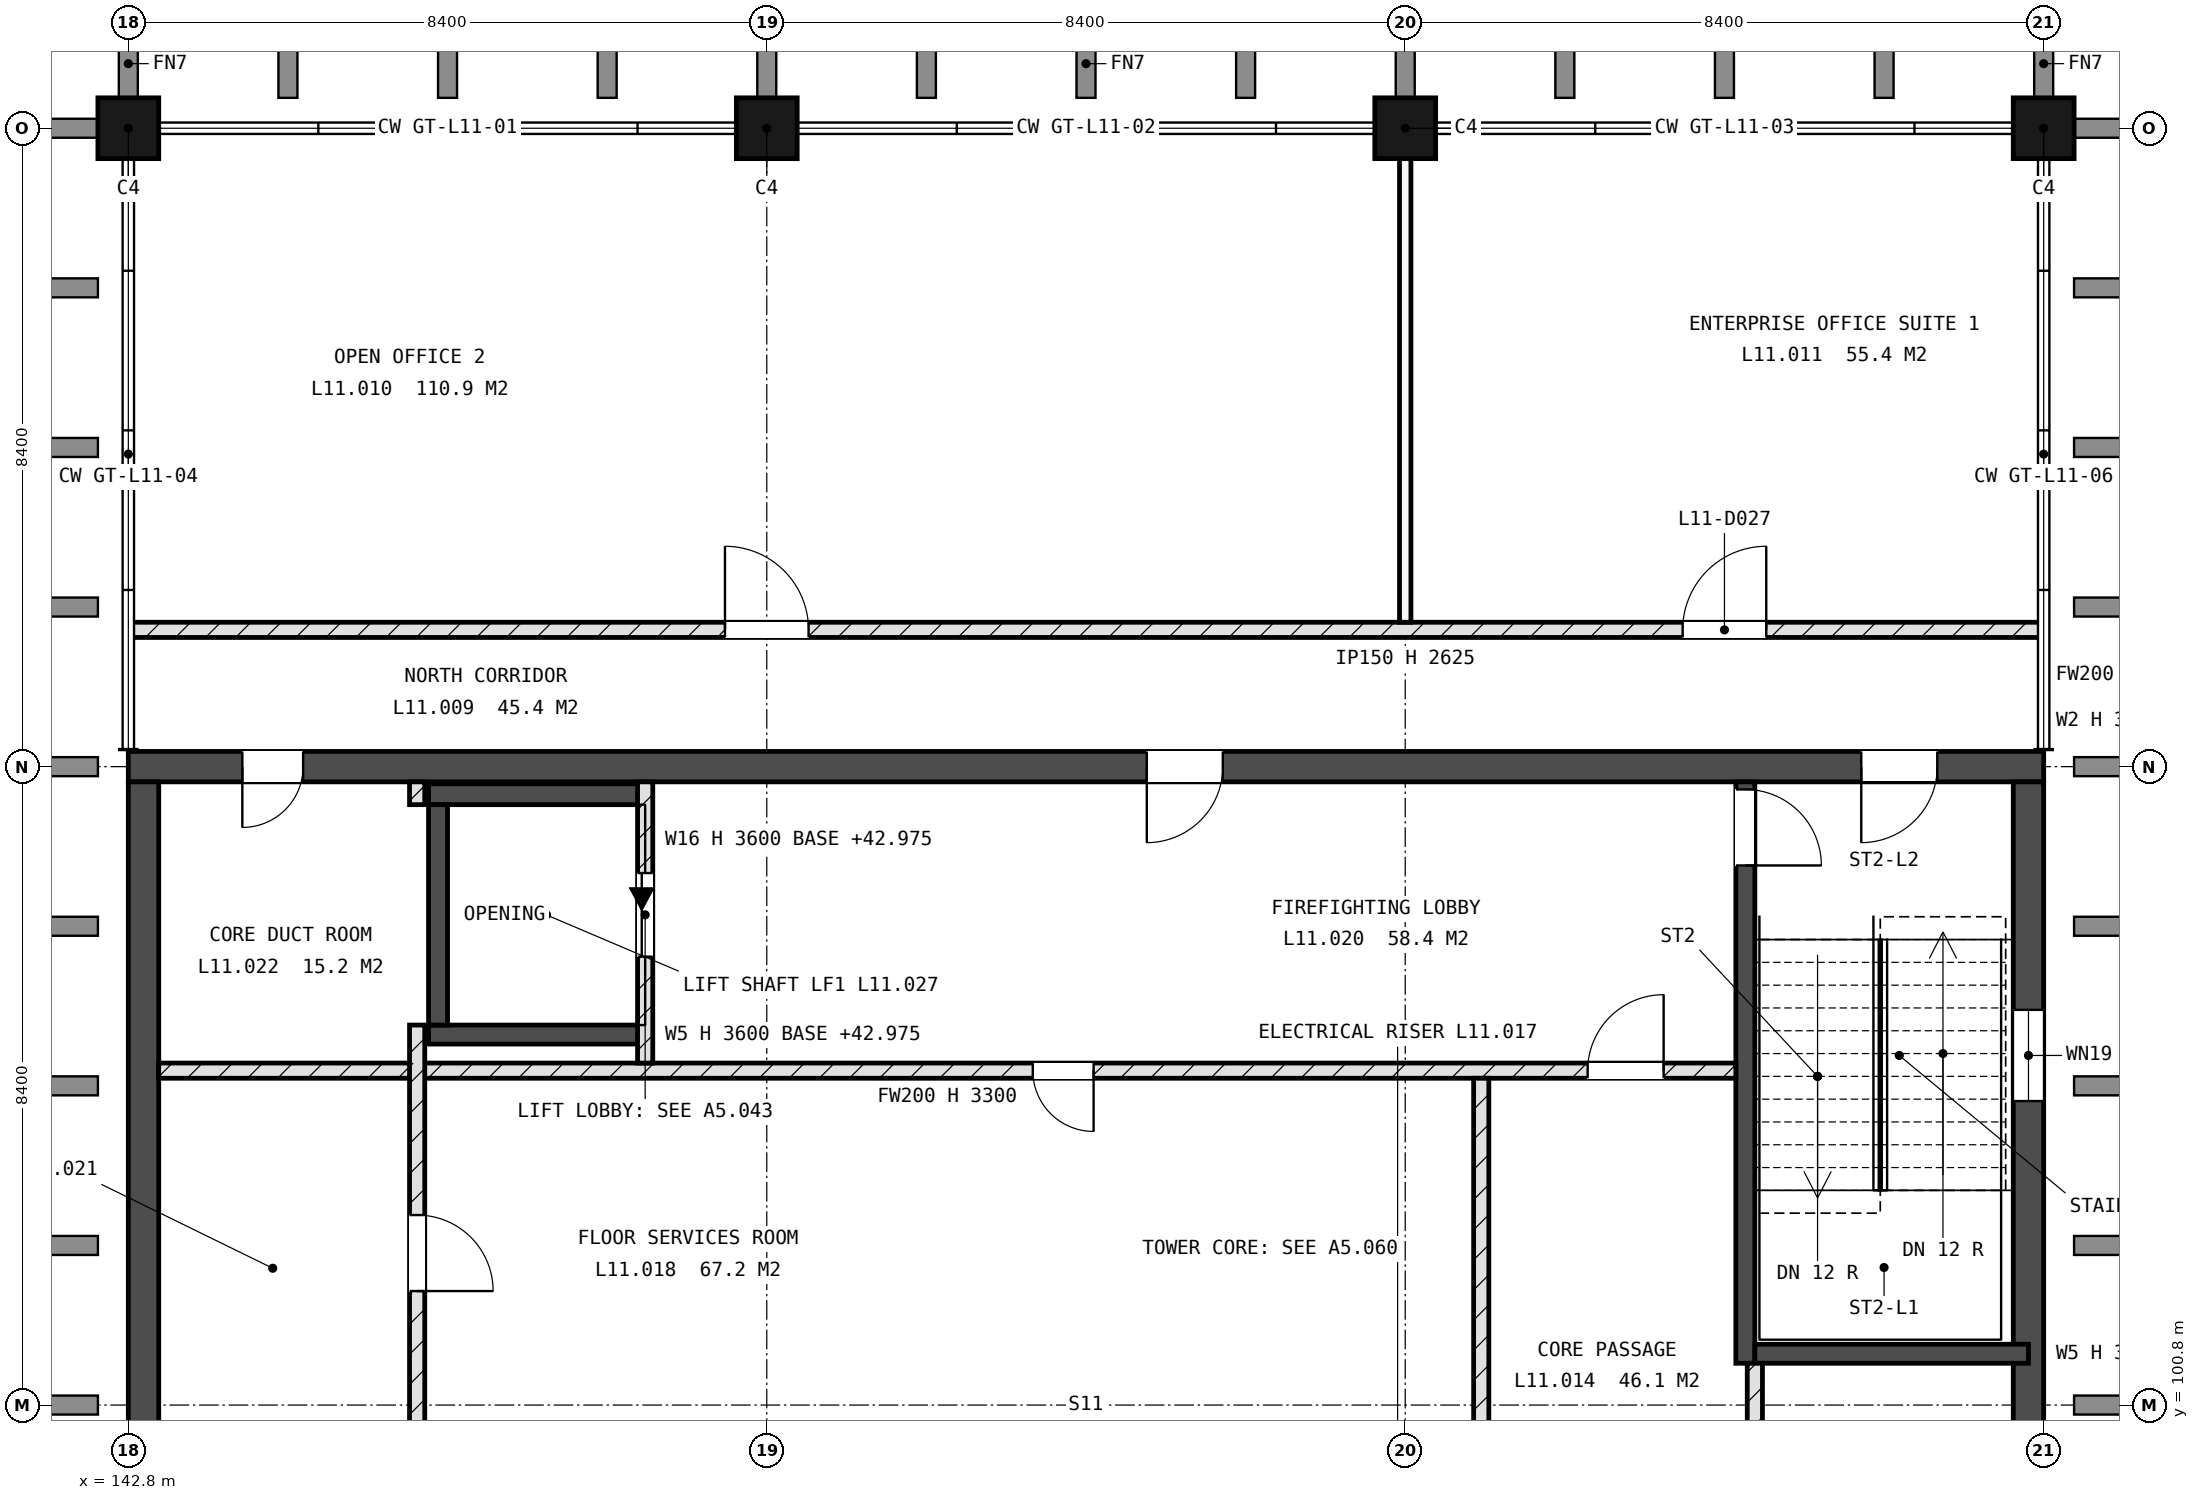
"""IFC4 building model, lengths in metres.
Left out: names, types, materials, properties, quantities, classifications, styles, units other than length and angle.
Written with IfcOpenShell. Run it as: python <this file> out.ifc"""

import sys

from ifc_helpers import new_model, si_unit, direction, frame, frame_2d, origin, origin_2d, place, context, subcontext, project, spatial, rectangle, extrude, element, fill, save


model = new_model("IFC4")
c1 = context("Model", 3, precision=1e-05, world=origin(), true_north=direction((0.0, 1.0)))
c2 = subcontext(c1, "Body", "Model", "MODEL_VIEW")
j1 = project(units=[si_unit("LENGTHUNIT", "METRE"), si_unit("PLANEANGLEUNIT", "RADIAN")], contexts=[c1])
p1 = place(None, origin())
s1 = spatial("IfcSite", under=j1, at=p1, CompositionType="ELEMENT")
p2 = place(p1, origin())
s2 = spatial("IfcBuilding", under=s1, at=p2, CompositionType="ELEMENT")
p3 = place(p2, frame((0.0, 0.0, 43.2)))
s3 = spatial("IfcBuildingStorey", under=s2, at=p3, CompositionType="ELEMENT", Elevation=43.2)
for number, where, z_axis, x_axis in (
    (1, (142.8, 117.6, -0.225), (0.0, 0.0, 1.0), (1.0, 0.0, 0.0)),
    (2, (151.2, 117.6, -0.225), (0.0, 0.0, 1.0), (1.0, 0.0, 0.0)),
    (3, (159.6, 117.6, -0.225), (0.0, 0.0, 1.0), (1.0, 0.0, 0.0)),
    (4, (168.0, 117.6, -0.225), (0.0, 0.0, 1.0), (1.0, 0.0, 0.0)),
):
    element("IfcColumn", number, at=place(p3, frame(where, z_axis=z_axis, x_axis=x_axis)), inside=s3, PredefinedType="COLUMN", context=c2, shape_type="SweptSolid", body=[
        extrude(rectangle(XDim=0.8, YDim=0.8, at=origin_2d()), origin(), (0.0, 0.0, 1.0), 3.6),
    ])
p4 = place(p3, frame((142.8, 109.2, -0.225), z_axis=(0.0, 0.0, 1.0), x_axis=(1.0, 0.0, 0.0)))
e5 = element("IfcWall", 5, at=p4, inside=s3, PredefinedType="SHEAR", context=c2, shape_type="SweptSolid", body=[
    extrude(rectangle(XDim=25.2, YDim=0.4, at=frame_2d((12.6, 0.0))), origin(), (0.0, 0.0, 1.0), 3.6),
])
p5 = place(p4, frame((22.8, 0.0, 0.225)))
e6 = element("IfcOpeningElement", 6, at=p5, cuts=e5, PredefinedType="OPENING", context=c2, shape_type="SweptSolid", body=[
    extrude(rectangle(XDim=1.0, YDim=2.1, at=frame_2d((0.5, 1.05))), frame((0.0, 0.21, 0.0), z_axis=(0.0, -1.0, 0.0), x_axis=(1.0, 0.0, 0.0)), (0.0, 0.0, 1.0), 0.42),
])
p6 = place(p4, frame((1.5, 0.0, 0.225)))
e7 = element("IfcOpeningElement", 7, at=p6, cuts=e5, PredefinedType="OPENING", context=c2, shape_type="SweptSolid", body=[
    extrude(rectangle(XDim=0.8, YDim=2.1, at=frame_2d((0.4, 1.05))), frame((0.0, 0.21, 0.0), z_axis=(0.0, -1.0, 0.0), x_axis=(1.0, 0.0, 0.0)), (0.0, 0.0, 1.0), 0.42),
])
p7 = place(p4, frame((13.4, 0.0, 0.225)))
e8 = element("IfcOpeningElement", 8, at=p7, cuts=e5, PredefinedType="OPENING", context=c2, shape_type="SweptSolid", body=[
    extrude(rectangle(XDim=1.0, YDim=2.1, at=frame_2d((0.5, 1.05))), frame((0.0, 0.21, 0.0), z_axis=(0.0, -1.0, 0.0), x_axis=(1.0, 0.0, 0.0)), (0.0, 0.0, 1.0), 0.42),
])
p8 = place(p3, frame((143.0, 92.6, -0.225), z_axis=(0.0, 0.0, 1.0), x_axis=(0.0, 1.0, 0.0)))
e9 = element("IfcWall", 9, at=p8, inside=s3, PredefinedType="SHEAR", context=c2, shape_type="SweptSolid", body=[
    extrude(rectangle(XDim=16.4, YDim=0.4, at=frame_2d((8.2, 0.0))), origin(), (0.0, 0.0, 1.0), 3.6),
])
p9 = place(p8, frame((3.0, 0.0, 1.825)))
e10 = element("IfcOpeningElement", 10, at=p9, cuts=e9, PredefinedType="OPENING", context=c2, shape_type="SweptSolid", body=[
    extrude(rectangle(XDim=1.2, YDim=0.9, at=frame_2d((0.6, 0.45))), frame((0.0, 0.21, 0.0), z_axis=(0.0, -1.0, 0.0), x_axis=(1.0, 0.0, 0.0)), (0.0, 0.0, 1.0), 0.42),
])
p10 = place(p3, frame((167.8, 92.6, -0.225), z_axis=(0.0, 0.0, 1.0), x_axis=(0.0, 1.0, 0.0)))
e11 = element("IfcWall", 11, at=p10, inside=s3, PredefinedType="SHEAR", context=c2, shape_type="SweptSolid", body=[
    extrude(rectangle(XDim=16.4, YDim=0.4, at=frame_2d((8.2, 0.0))), origin(), (0.0, 0.0, 1.0), 3.6),
])
p11 = place(p10, frame((12.2, 0.0, 1.825)))
e12 = element("IfcOpeningElement", 12, at=p11, cuts=e11, PredefinedType="OPENING", context=c2, shape_type="SweptSolid", body=[
    extrude(rectangle(XDim=1.2, YDim=0.9, at=frame_2d((0.6, 0.45))), frame((0.0, 0.21, 0.0), z_axis=(0.0, -1.0, 0.0), x_axis=(1.0, 0.0, 0.0)), (0.0, 0.0, 1.0), 0.42),
])
p12 = place(p3, frame((164.075, 101.35, -0.225), z_axis=(0.0, 0.0, 1.0), x_axis=(0.0, 1.0, 0.0)))
e13 = element("IfcWall", 13, at=p12, inside=s3, PredefinedType="SHEAR", context=c2, shape_type="SweptSolid", body=[
    extrude(rectangle(XDim=7.65, YDim=0.25, at=frame_2d((3.825, 0.0))), origin(), (0.0, 0.0, 1.0), 3.6),
])
p13 = place(p12, frame((6.55, 0.0, 0.225)))
e14 = element("IfcOpeningElement", 14, at=p13, cuts=e13, PredefinedType="OPENING", context=c2, shape_type="SweptSolid", body=[
    extrude(rectangle(XDim=1.0, YDim=2.1, at=frame_2d((0.5, 1.05))), frame((0.0, 0.135, 0.0), z_axis=(0.0, -1.0, 0.0), x_axis=(1.0, 0.0, 0.0)), (0.0, 0.0, 1.0), 0.27),
])
p14 = place(p3, frame((164.2, 101.475, -0.225), z_axis=(0.0, 0.0, 1.0), x_axis=(1.0, 0.0, 0.0)))
e15 = element("IfcWall", 15, at=p14, inside=s3, PredefinedType="SHEAR", context=c2, shape_type="SweptSolid", body=[
    extrude(rectangle(XDim=3.6, YDim=0.25, at=frame_2d((1.8, 0.0))), origin(), (0.0, 0.0, 1.0), 3.6),
])
p15 = place(p3, frame((146.75, 105.675, -0.225), z_axis=(0.0, 0.0, 1.0), x_axis=(1.0, 0.0, 0.0)))
e16 = element("IfcWall", 16, at=p15, inside=s3, PredefinedType="SHEAR", context=c2, shape_type="SweptSolid", body=[
    extrude(rectangle(XDim=2.85, YDim=0.25, at=frame_2d((1.425, 0.0))), origin(), (0.0, 0.0, 1.0), 3.6),
])
p16 = place(p3, frame((146.75, 108.837, -0.225), z_axis=(0.0, 0.0, 1.0), x_axis=(1.0, 0.0, 0.0)))
e17 = element("IfcWall", 17, at=p16, inside=s3, PredefinedType="SHEAR", context=c2, shape_type="SweptSolid", body=[
    extrude(rectangle(XDim=2.85, YDim=0.275, at=frame_2d((1.425, 0.0))), origin(), (0.0, 0.0, 1.0), 3.6),
])
p17 = place(p3, frame((146.875, 105.8, -0.225), z_axis=(0.0, 0.0, 1.0), x_axis=(0.0, 1.0, 0.0)))
e18 = element("IfcWall", 18, at=p17, inside=s3, PredefinedType="SHEAR", context=c2, shape_type="SweptSolid", body=[
    extrude(rectangle(XDim=2.9, YDim=0.25, at=frame_2d((1.45, 0.0))), origin(), (0.0, 0.0, 1.0), 3.6),
])
p18 = place(p3, frame((143.2, 105.2, 0.0), z_axis=(0.0, 0.0, 1.0), x_axis=(1.0, 0.0, 0.0)))
e19 = element("IfcWall", 19, at=p18, inside=s3, PredefinedType="SOLIDWALL", context=c2, shape_type="SweptSolid", body=[
    extrude(rectangle(XDim=20.75, YDim=0.2, at=frame_2d((10.375, 0.0))), origin(), (0.0, 0.0, 1.0), 3.3),
])
p19 = place(p18, frame((11.5, 0.0, 0.0)))
e20 = element("IfcOpeningElement", 20, at=p19, cuts=e19, PredefinedType="OPENING", context=c2, shape_type="SweptSolid", body=[
    extrude(rectangle(XDim=0.8, YDim=2.1, at=frame_2d((0.4, 1.05))), frame((0.0, 0.11, 0.0), z_axis=(0.0, -1.0, 0.0), x_axis=(1.0, 0.0, 0.0)), (0.0, 0.0, 1.0), 0.22),
])
p20 = place(p18, frame((18.8, 0.0, 0.0)))
e21 = element("IfcOpeningElement", 21, at=p20, cuts=e19, PredefinedType="OPENING", context=c2, shape_type="SweptSolid", body=[
    extrude(rectangle(XDim=1.0, YDim=2.1, at=frame_2d((0.5, 1.05))), frame((0.0, 0.11, 0.0), z_axis=(0.0, -1.0, 0.0), x_axis=(1.0, 0.0, 0.0)), (0.0, 0.0, 1.0), 0.22),
])
p21 = place(p3, frame((142.8, 111.0, 0.0), z_axis=(0.0, 0.0, 1.0), x_axis=(1.0, 0.0, 0.0)))
e22 = element("IfcWall", 22, at=p21, inside=s3, PredefinedType="SOLIDWALL", context=c2, shape_type="SweptSolid", body=[
    extrude(rectangle(XDim=25.2, YDim=0.2, at=frame_2d((12.6, 0.0))), origin(), (0.0, 0.0, 1.0), 3.3),
])
p22 = place(p21, frame((7.85, 0.0, 0.0)))
e23 = element("IfcOpeningElement", 23, at=p22, cuts=e22, PredefinedType="OPENING", context=c2, shape_type="SweptSolid", body=[
    extrude(rectangle(XDim=1.1, YDim=2.25, at=frame_2d((0.55, 1.125))), frame((0.0, 0.11, 0.0), z_axis=(0.0, -1.0, 0.0), x_axis=(1.0, 0.0, 0.0)), (0.0, 0.0, 1.0), 0.22),
])
p23 = place(p21, frame((20.45, 0.0, 0.0)))
e24 = element("IfcOpeningElement", 24, at=p23, cuts=e22, PredefinedType="OPENING", context=c2, shape_type="SweptSolid", body=[
    extrude(rectangle(XDim=1.1, YDim=2.25, at=frame_2d((0.55, 1.125))), frame((0.0, 0.11, 0.0), z_axis=(0.0, -1.0, 0.0), x_axis=(1.0, 0.0, 0.0)), (0.0, 0.0, 1.0), 0.22),
])
p24 = place(p3, frame((146.6, 100.5, 0.0), z_axis=(0.0, 0.0, 1.0), x_axis=(0.0, 1.0, 0.0)))
e25 = element("IfcWall", 25, at=p24, inside=s3, PredefinedType="SOLIDWALL", context=c2, shape_type="SweptSolid", body=[
    extrude(rectangle(XDim=5.3, YDim=0.2, at=frame_2d((2.65, 0.0))), origin(), (0.0, 0.0, 1.0), 3.3),
])
p25 = place(p24, frame((1.8, 0.0, 0.0)))
e26 = element("IfcOpeningElement", 26, at=p25, cuts=e25, PredefinedType="OPENING", context=c2, shape_type="SweptSolid", body=[
    extrude(rectangle(XDim=1.0, YDim=2.1, at=frame_2d((0.5, 1.05))), frame((0.0, 0.11, 0.0), z_axis=(0.0, -1.0, 0.0), x_axis=(1.0, 0.0, 0.0)), (0.0, 0.0, 1.0), 0.22),
])
p26 = place(p3, frame((146.6, 108.7, 0.0), z_axis=(0.0, 0.0, 1.0), x_axis=(0.0, 1.0, 0.0)))
e27 = element("IfcWall", 27, at=p26, inside=s3, PredefinedType="SOLIDWALL", context=c2, shape_type="SweptSolid", body=[
    extrude(rectangle(XDim=0.3, YDim=0.2, at=frame_2d((0.15, 0.0))), origin(), (0.0, 0.0, 1.0), 3.3),
])
p27 = place(p3, frame((149.6, 105.3, 0.0), z_axis=(0.0, 0.0, 1.0), x_axis=(0.0, 1.0, 0.0)))
e28 = element("IfcWall", 28, at=p27, inside=s3, PredefinedType="SOLIDWALL", context=c2, shape_type="SweptSolid", body=[
    extrude(rectangle(XDim=3.7, YDim=0.2, at=frame_2d((1.85, 0.0))), origin(), (0.0, 0.0, 1.0), 3.3),
])
p28 = place(p27, frame((1.4, 0.0, 0.0)))
e29 = element("IfcOpeningElement", 29, at=p28, cuts=e28, PredefinedType="OPENING", context=c2, shape_type="SweptSolid", body=[
    extrude(rectangle(XDim=1.1, YDim=2.1, at=frame_2d((0.55, 1.05))), frame((0.0, 0.11, 0.0), z_axis=(0.0, -1.0, 0.0), x_axis=(1.0, 0.0, 0.0)), (0.0, 0.0, 1.0), 0.22),
])
p29 = place(p3, frame((159.6, 111.1, 0.0), z_axis=(0.0, 0.0, 1.0), x_axis=(0.0, 1.0, 0.0)))
e30 = element("IfcWall", 30, at=p29, inside=s3, PredefinedType="PARTITIONING", context=c2, shape_type="SweptSolid", body=[
    extrude(rectangle(XDim=6.5, YDim=0.15, at=frame_2d((3.25, 0.0))), origin(), (0.0, 0.0, 1.0), 2.625),
])
p30 = place(p3, frame((160.6, 92.6, 0.0), z_axis=(0.0, 0.0, 1.0), x_axis=(0.0, 1.0, 0.0)))
e31 = element("IfcWall", 31, at=p30, inside=s3, PredefinedType="SOLIDWALL", context=c2, shape_type="SweptSolid", body=[
    extrude(rectangle(XDim=12.5, YDim=0.2, at=frame_2d((6.25, 0.0))), origin(), (0.0, 0.0, 1.0), 3.3),
])
p31 = place(p30, frame((5.1, 0.0, 0.0)))
e32 = element("IfcOpeningElement", 32, at=p31, cuts=e31, PredefinedType="OPENING", context=c2, shape_type="SweptSolid", body=[
    extrude(rectangle(XDim=0.8, YDim=2.1, at=frame_2d((0.4, 1.05))), frame((0.0, 0.11, 0.0), z_axis=(0.0, -1.0, 0.0), x_axis=(1.0, 0.0, 0.0)), (0.0, 0.0, 1.0), 0.22),
])
p32 = place(p30, frame((0.8, 0.0, 0.0)))
e33 = element("IfcOpeningElement", 33, at=p32, cuts=e31, PredefinedType="OPENING", context=c2, shape_type="SweptSolid", body=[
    extrude(rectangle(XDim=1.0, YDim=2.1, at=frame_2d((0.5, 1.05))), frame((0.0, 0.11, 0.0), z_axis=(0.0, -1.0, 0.0), x_axis=(1.0, 0.0, 0.0)), (0.0, 0.0, 1.0), 0.22),
])
p33 = place(p3, frame((164.2, 92.6, 0.0), z_axis=(0.0, 0.0, 1.0), x_axis=(0.0, 1.0, 0.0)))
e34 = element("IfcWall", 34, at=p33, inside=s3, PredefinedType="SOLIDWALL", context=c2, shape_type="SweptSolid", body=[
    extrude(rectangle(XDim=8.75, YDim=0.2, at=frame_2d((4.375, 0.0))), origin(), (0.0, 0.0, 1.0), 3.3),
])
p34 = place(p33, frame((1.7, 0.0, 0.0)))
e35 = element("IfcOpeningElement", 35, at=p34, cuts=e34, PredefinedType="OPENING", context=c2, shape_type="SweptSolid", body=[
    extrude(rectangle(XDim=0.8, YDim=2.1, at=frame_2d((0.4, 1.05))), frame((0.0, 0.11, 0.0), z_axis=(0.0, -1.0, 0.0), x_axis=(1.0, 0.0, 0.0)), (0.0, 0.0, 1.0), 0.22),
])
p35 = place(p33, frame((6.3, 0.0, 0.0)))
e36 = element("IfcOpeningElement", 36, at=p35, cuts=e34, PredefinedType="OPENING", context=c2, shape_type="SweptSolid", body=[
    extrude(rectangle(XDim=0.8, YDim=2.1, at=frame_2d((0.4, 1.05))), frame((0.0, 0.11, 0.0), z_axis=(0.0, -1.0, 0.0), x_axis=(1.0, 0.0, 0.0)), (0.0, 0.0, 1.0), 0.22),
])
p36 = place(p11, origin())
e37 = element("IfcWindow", 37, at=p36, inside=s3, PartitioningType="SINGLE_PANEL", PredefinedType="WINDOW", context=c2, shape_type="SweptSolid", body=[
    extrude(rectangle(XDim=1.2, YDim=0.9, at=frame_2d((0.6, 0.45))), frame((0.0, 0.03, 0.0), z_axis=(0.0, -1.0, 0.0), x_axis=(1.0, 0.0, 0.0)), (0.0, 0.0, 1.0), 0.06),
])
fill(e12, e37)
p37 = place(p28, origin())
e38 = element("IfcDoor", 38, at=p37, inside=s3, OperationType="SLIDING_TO_LEFT", PredefinedType="DOOR", context=c2, shape_type="SweptSolid", body=[
    extrude(rectangle(XDim=1.1, YDim=2.1, at=frame_2d((0.55, 1.05))), frame((0.0, 0.025, 0.0), z_axis=(0.0, -1.0, 0.0), x_axis=(1.0, 0.0, 0.0)), (0.0, 0.0, 1.0), 0.05),
])
fill(e29, e38)
p38 = place(p13, origin())
e39 = element("IfcDoor", 39, at=p38, inside=s3, OperationType="SINGLE_SWING_LEFT", PredefinedType="DOOR", context=c2, shape_type="SweptSolid", body=[
    extrude(rectangle(XDim=1.0, YDim=2.1, at=frame_2d((0.5, 1.05))), frame((0.0, 0.025, 0.0), z_axis=(0.0, -1.0, 0.0), x_axis=(1.0, 0.0, 0.0)), (0.0, 0.0, 1.0), 0.05),
])
fill(e14, e39)
p39 = place(p5, origin())
e40 = element("IfcDoor", 40, at=p39, inside=s3, OperationType="SINGLE_SWING_LEFT", PredefinedType="DOOR", context=c2, shape_type="SweptSolid", body=[
    extrude(rectangle(XDim=1.0, YDim=2.1, at=frame_2d((0.5, 1.05))), frame((0.0, 0.025, 0.0), z_axis=(0.0, -1.0, 0.0), x_axis=(1.0, 0.0, 0.0)), (0.0, 0.0, 1.0), 0.05),
])
fill(e6, e40)
p40 = place(p22, origin())
e41 = element("IfcDoor", 41, at=p40, inside=s3, OperationType="SINGLE_SWING_RIGHT", PredefinedType="DOOR", context=c2, shape_type="SweptSolid", body=[
    extrude(rectangle(XDim=1.1, YDim=2.25, at=frame_2d((0.55, 1.125))), frame((0.0, 0.025, 0.0), z_axis=(0.0, -1.0, 0.0), x_axis=(1.0, 0.0, 0.0)), (0.0, 0.0, 1.0), 0.05),
])
fill(e23, e41)
p41 = place(p23, origin())
e42 = element("IfcDoor", 42, at=p41, inside=s3, OperationType="SINGLE_SWING_LEFT", PredefinedType="DOOR", context=c2, shape_type="SweptSolid", body=[
    extrude(rectangle(XDim=1.1, YDim=2.25, at=frame_2d((0.55, 1.125))), frame((0.0, 0.025, 0.0), z_axis=(0.0, -1.0, 0.0), x_axis=(1.0, 0.0, 0.0)), (0.0, 0.0, 1.0), 0.05),
])
fill(e24, e42)
p42 = place(p19, origin())
e43 = element("IfcDoor", 43, at=p42, inside=s3, OperationType="SINGLE_SWING_RIGHT", PredefinedType="DOOR", context=c2, shape_type="SweptSolid", body=[
    extrude(rectangle(XDim=0.8, YDim=2.1, at=frame_2d((0.4, 1.05))), frame((0.0, 0.025, 0.0), z_axis=(0.0, -1.0, 0.0), x_axis=(1.0, 0.0, 0.0)), (0.0, 0.0, 1.0), 0.05),
])
fill(e20, e43)
p43 = place(p25, origin())
e44 = element("IfcDoor", 44, at=p43, inside=s3, OperationType="SINGLE_SWING_LEFT", PredefinedType="DOOR", context=c2, shape_type="SweptSolid", body=[
    extrude(rectangle(XDim=1.0, YDim=2.1, at=frame_2d((0.5, 1.05))), frame((0.0, 0.025, 0.0), z_axis=(0.0, -1.0, 0.0), x_axis=(1.0, 0.0, 0.0)), (0.0, 0.0, 1.0), 0.05),
])
fill(e26, e44)
p44 = place(p6, origin())
e45 = element("IfcDoor", 45, at=p44, inside=s3, OperationType="SINGLE_SWING_LEFT", PredefinedType="DOOR", context=c2, shape_type="SweptSolid", body=[
    extrude(rectangle(XDim=0.8, YDim=2.1, at=frame_2d((0.4, 1.05))), frame((0.0, 0.025, 0.0), z_axis=(0.0, -1.0, 0.0), x_axis=(1.0, 0.0, 0.0)), (0.0, 0.0, 1.0), 0.05),
])
fill(e7, e45)
p45 = place(p7, origin())
e46 = element("IfcDoor", 46, at=p45, inside=s3, OperationType="SINGLE_SWING_LEFT", PredefinedType="DOOR", context=c2, shape_type="SweptSolid", body=[
    extrude(rectangle(XDim=1.0, YDim=2.1, at=frame_2d((0.5, 1.05))), frame((0.0, 0.025, 0.0), z_axis=(0.0, -1.0, 0.0), x_axis=(1.0, 0.0, 0.0)), (0.0, 0.0, 1.0), 0.05),
])
fill(e8, e46)
p46 = place(p20, origin())
e47 = element("IfcDoor", 47, at=p46, inside=s3, OperationType="SINGLE_SWING_LEFT", PredefinedType="DOOR", context=c2, shape_type="SweptSolid", body=[
    extrude(rectangle(XDim=1.0, YDim=2.1, at=frame_2d((0.5, 1.05))), frame((0.0, 0.025, 0.0), z_axis=(0.0, -1.0, 0.0), x_axis=(1.0, 0.0, 0.0)), (0.0, 0.0, 1.0), 0.05),
])
fill(e21, e47)
save(model, sys.argv[1])
